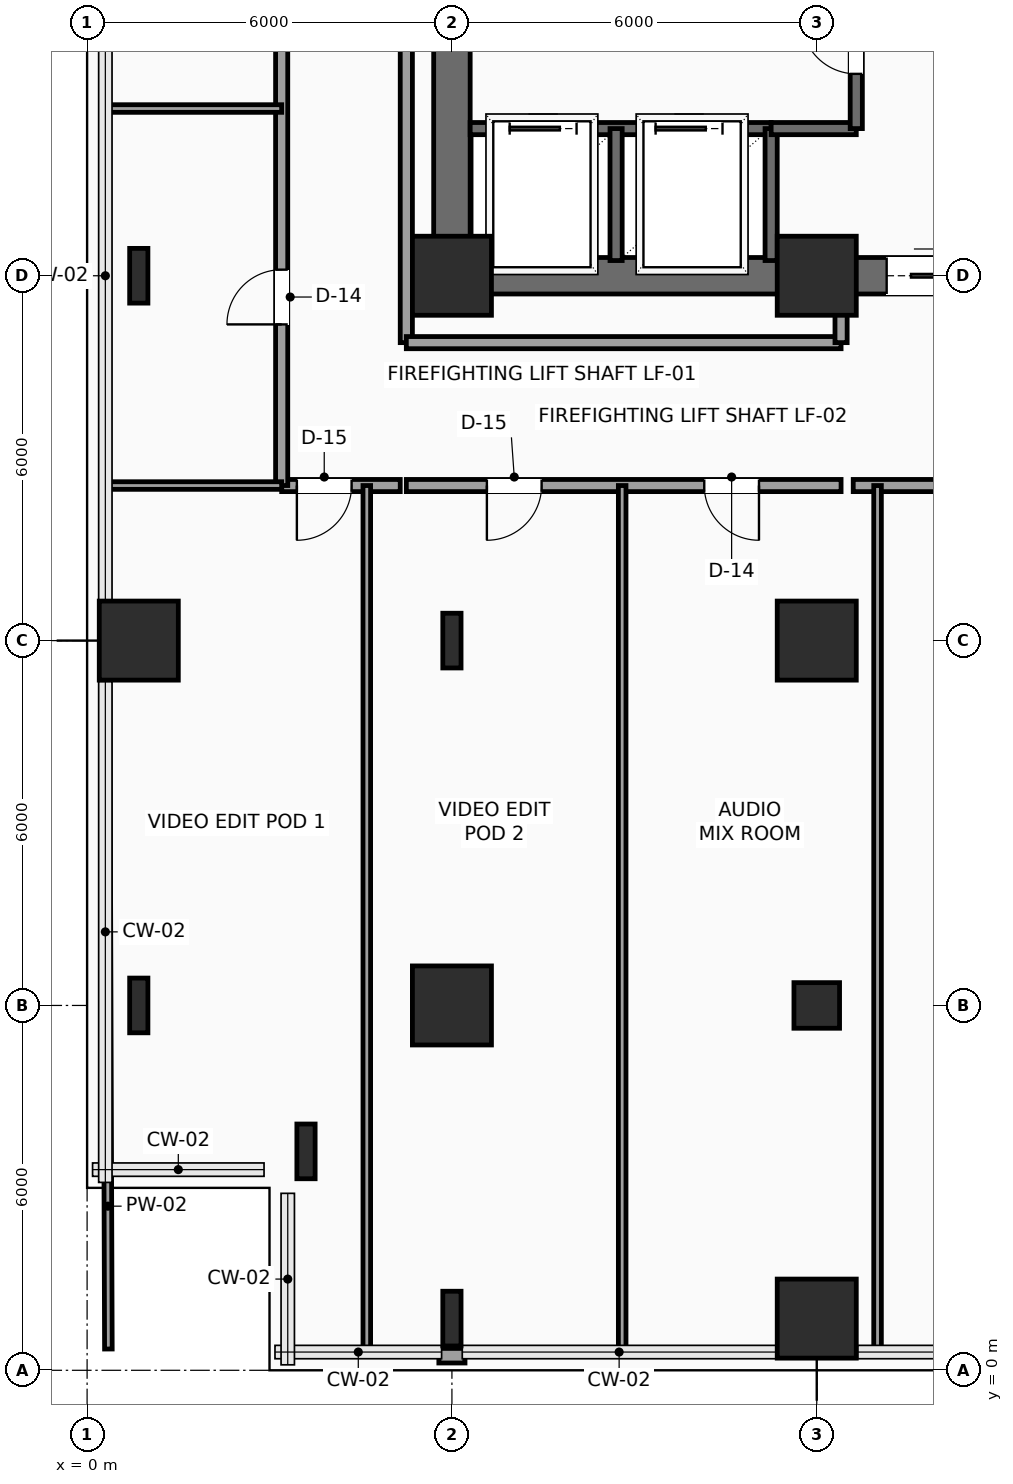
"""IFC4 building model, lengths in metres.
Left out: names, types, materials, properties, quantities, classifications, styles, units other than length and angle.
Written with IfcOpenShell. Run it as: python <this file> out.ifc"""

import sys

from ifc_helpers import new_model, si_unit, direction, frame, frame_2d, origin, origin_2d, place, context, subcontext, project, spatial, rectangle, hollow_rectangle, i_section, extrude, element, fill, save


model = new_model("IFC4")
c1 = context("Model", 3, precision=1e-05, world=origin(), true_north=direction((0.0, 1.0)))
c2 = subcontext(c1, "Body", "Model", "MODEL_VIEW")
j1 = project(units=[si_unit("LENGTHUNIT", "METRE"), si_unit("PLANEANGLEUNIT", "RADIAN")], contexts=[c1])
p1 = place(None, origin())
s1 = spatial("IfcSite", under=j1, at=p1, CompositionType="ELEMENT")
p2 = place(p1, origin())
s2 = spatial("IfcBuilding", under=s1, at=p2, CompositionType="ELEMENT")
p3 = place(p2, frame((0.0, 0.0, 44.1)))
s3 = spatial("IfcBuildingStorey", under=s2, at=p3, CompositionType="ELEMENT", Elevation=44.1)
for number, where, z_axis, x_axis in (
    (1, (6.0, 18.0, 0.0), (0.0, 0.0, 1.0), (1.0, 0.0, 0.0)),
    (2, (12.0, 18.0, 0.0), (0.0, 0.0, 1.0), (1.0, 0.0, 0.0)),
):
    element("IfcColumn", number, at=place(p3, frame(where, z_axis=z_axis, x_axis=x_axis)), inside=s3, PredefinedType="COLUMN", context=c2, shape_type="SweptSolid", body=[
        extrude(rectangle(XDim=1.3, YDim=1.3, at=origin_2d()), origin(), (0.0, 0.0, 1.0), 3.9),
    ])
for number, where, z_axis, x_axis in (
    (3, (3.6, 3.6, 0.0), (0.0, 0.0, 1.0), (1.0, 0.0, 0.0)),
    (4, (0.85, 6.0, 0.0), (0.0, 0.0, 1.0), (1.0, 0.0, 0.0)),
):
    element("IfcColumn", number, at=place(p3, frame(where, z_axis=z_axis, x_axis=x_axis)), inside=s3, PredefinedType="COLUMN", context=c2, shape_type="SweptSolid", body=[
        extrude(i_section(OverallWidth=0.3, OverallDepth=0.9, WebThickness=0.019, FlangeThickness=0.035, FilletRadius=0.03, at=origin_2d()), origin(), (0.0, 0.0, 1.0), 3.9),
    ])
p4 = place(p3, frame((0.85, 12.0, 0.0), z_axis=(0.0, 0.0, 1.0), x_axis=(1.0, 0.0, 0.0)))
e5 = element("IfcColumn", 5, at=p4, inside=s3, PredefinedType="COLUMN", context=c2, shape_type="SweptSolid", body=[
    extrude(rectangle(XDim=1.3, YDim=1.3, at=origin_2d()), origin(), (0.0, 0.0, 1.0), 3.9),
])
for number, where, z_axis, x_axis in (
    (6, (0.85, 18.0, 0.0), (0.0, 0.0, 1.0), (1.0, 0.0, 0.0)),
    (7, (6.0, 0.85, 0.0), (0.0, 0.0, 1.0), (1.0, 0.0, 0.0)),
):
    element("IfcColumn", number, at=place(p3, frame(where, z_axis=z_axis, x_axis=x_axis)), inside=s3, PredefinedType="COLUMN", context=c2, shape_type="SweptSolid", body=[
        extrude(i_section(OverallWidth=0.3, OverallDepth=0.9, WebThickness=0.019, FlangeThickness=0.035, FilletRadius=0.03, at=origin_2d()), origin(), (0.0, 0.0, 1.0), 3.9),
    ])
p5 = place(p3, frame((6.0, 6.0, 0.0), z_axis=(0.0, 0.0, 1.0), x_axis=(1.0, 0.0, 0.0)))
e8 = element("IfcColumn", 8, at=p5, inside=s3, PredefinedType="COLUMN", context=c2, shape_type="SweptSolid", body=[
    extrude(rectangle(XDim=1.3, YDim=1.3, at=origin_2d()), origin(), (0.0, 0.0, 1.0), 3.9),
])
p6 = place(p3, frame((6.0, 12.0, 0.0), z_axis=(0.0, 0.0, 1.0), x_axis=(1.0, 0.0, 0.0)))
e9 = element("IfcColumn", 9, at=p6, inside=s3, PredefinedType="COLUMN", context=c2, shape_type="SweptSolid", body=[
    extrude(i_section(OverallWidth=0.3, OverallDepth=0.9, WebThickness=0.019, FlangeThickness=0.035, FilletRadius=0.03, at=origin_2d()), origin(), (0.0, 0.0, 1.0), 3.9),
])
p7 = place(p3, frame((12.0, 0.85, 0.0), z_axis=(0.0, 0.0, 1.0), x_axis=(1.0, 0.0, 0.0)))
e10 = element("IfcColumn", 10, at=p7, inside=s3, PredefinedType="COLUMN", context=c2, shape_type="SweptSolid", body=[
    extrude(rectangle(XDim=1.3, YDim=1.3, at=origin_2d()), origin(), (0.0, 0.0, 1.0), 3.9),
])
p8 = place(p3, frame((12.0, 6.0, 0.0), z_axis=(0.0, 0.0, 1.0), x_axis=(1.0, 0.0, 0.0)))
e11 = element("IfcColumn", 11, at=p8, inside=s3, PredefinedType="COLUMN", context=c2, shape_type="SweptSolid", body=[
    extrude(hollow_rectangle(XDim=0.75, YDim=0.75, WallThickness=0.035, InnerFilletRadius=0.035, OuterFilletRadius=0.05, at=origin_2d()), origin(), (0.0, 0.0, 1.0), 3.9),
])
p9 = place(p3, frame((12.0, 12.0, 0.0), z_axis=(0.0, 0.0, 1.0), x_axis=(1.0, 0.0, 0.0)))
e12 = element("IfcColumn", 12, at=p9, inside=s3, PredefinedType="COLUMN", context=c2, shape_type="SweptSolid", body=[
    extrude(rectangle(XDim=1.3, YDim=1.3, at=origin_2d()), origin(), (0.0, 0.0, 1.0), 3.9),
])
p10 = place(p3, frame((6.215, 0.24, 0.0), z_axis=(0.0, 0.0, 1.0), x_axis=(-1.0, 0.0, 0.0)))
e13 = element("IfcWall", 13, at=p10, inside=s3, PredefinedType="SOLIDWALL", context=c2, shape_type="SweptSolid", body=[
    extrude(rectangle(XDim=0.43, YDim=0.24, at=frame_2d((0.215, 0.0))), origin(), (0.0, 0.0, 1.0), 3.65),
])
p11 = place(p3, frame((6.0, 18.0, 0.0), z_axis=(0.0, 0.0, 1.0), x_axis=(1.0, 0.0, 0.0)))
e14 = element("IfcWall", 14, at=p11, inside=s3, PredefinedType="SHEAR", context=c2, shape_type="SweptSolid", body=[
    extrude(rectangle(XDim=12.0, YDim=0.6, at=frame_2d((6.0, 0.0))), origin(), (0.0, 0.0, 1.0), 3.65),
])
p12 = place(p11, frame((7.15, 0.0, 0.0)))
e15 = element("IfcOpeningElement", 15, at=p12, cuts=e14, PredefinedType="OPENING", context=c2, shape_type="SweptSolid", body=[
    extrude(rectangle(XDim=1.6, YDim=2.3, at=frame_2d((0.8, 1.15))), frame((0.0, 0.31, 0.0), z_axis=(0.0, -1.0, 0.0), x_axis=(1.0, 0.0, 0.0)), (0.0, 0.0, 1.0), 0.62),
])
p13 = place(p3, frame((6.0, 18.0, 0.0), z_axis=(0.0, 0.0, 1.0), x_axis=(0.0, 1.0, 0.0)))
e16 = element("IfcWall", 16, at=p13, inside=s3, PredefinedType="SHEAR", context=c2, shape_type="SweptSolid", body=[
    extrude(rectangle(XDim=9.6, YDim=0.6, at=frame_2d((4.8, 0.0))), origin(), (0.0, 0.0, 1.0), 3.65),
])
p14 = place(p3, frame((6.3, 20.42, 0.0), z_axis=(0.0, 0.0, 1.0), x_axis=(1.0, 0.0, 0.0)))
e17 = element("IfcWall", 17, at=p14, inside=s3, PredefinedType="SHEAR", context=c2, shape_type="SweptSolid", body=[
    extrude(rectangle(XDim=4.95, YDim=0.2, at=frame_2d((2.475, 0.0))), origin(), (0.0, 0.0, 1.0), 3.65),
])
p15 = place(p14, frame((0.65, 0.0, 0.0)))
e18 = element("IfcOpeningElement", 18, at=p15, cuts=e17, PredefinedType="OPENING", context=c2, shape_type="SweptSolid", body=[
    extrude(rectangle(XDim=1.1, YDim=2.2, at=frame_2d((0.55, 1.1))), frame((0.0, 0.11, 0.0), z_axis=(0.0, -1.0, 0.0), x_axis=(1.0, 0.0, 0.0)), (0.0, 0.0, 1.0), 0.22),
])
p16 = place(p14, frame((3.05, 0.0, 0.0)))
e19 = element("IfcOpeningElement", 19, at=p16, cuts=e17, PredefinedType="OPENING", context=c2, shape_type="SweptSolid", body=[
    extrude(rectangle(XDim=1.1, YDim=2.2, at=frame_2d((0.55, 1.1))), frame((0.0, 0.11, 0.0), z_axis=(0.0, -1.0, 0.0), x_axis=(1.0, 0.0, 0.0)), (0.0, 0.0, 1.0), 0.22),
])
for number, where, z_axis, x_axis in (
    (20, (8.7, 18.25, 0.0), (0.0, 0.0, 1.0), (0.0, 1.0, 0.0)),
    (21, (11.25, 18.25, 0.0), (0.0, 0.0, 1.0), (0.0, 1.0, 0.0)),
):
    element("IfcWall", number, at=place(p3, frame(where, z_axis=z_axis, x_axis=x_axis)), inside=s3, PredefinedType="SHEAR", context=c2, shape_type="SweptSolid", body=[
        extrude(rectangle(XDim=2.17, YDim=0.2, at=frame_2d((1.085, 0.0))), origin(), (0.0, 0.0, 1.0), 3.65),
    ])
p17 = place(p3, frame((11.25, 20.42, 0.0), z_axis=(0.0, 0.0, 1.0), x_axis=(1.0, 0.0, 0.0)))
e22 = element("IfcWall", 22, at=p17, inside=s3, PredefinedType="SHEAR", context=c2, shape_type="SweptSolid", body=[
    extrude(rectangle(XDim=1.4, YDim=0.2, at=frame_2d((0.7, 0.0))), origin(), (0.0, 0.0, 1.0), 3.65),
])
p18 = place(p3, frame((12.65, 20.42, 0.0), z_axis=(0.0, 0.0, 1.0), x_axis=(0.0, 1.0, 0.0)))
e23 = element("IfcWall", 23, at=p18, inside=s3, PredefinedType="SHEAR", context=c2, shape_type="SweptSolid", body=[
    extrude(rectangle(XDim=2.84, YDim=0.2, at=frame_2d((1.42, 0.0))), origin(), (0.0, 0.0, 1.0), 3.65),
])
p19 = place(p18, frame((0.9, 0.0, 0.0)))
e24 = element("IfcOpeningElement", 24, at=p19, cuts=e23, PredefinedType="OPENING", context=c2, shape_type="SweptSolid", body=[
    extrude(rectangle(XDim=0.9, YDim=2.15, at=frame_2d((0.45, 1.075))), frame((0.0, 0.11, 0.0), z_axis=(0.0, -1.0, 0.0), x_axis=(1.0, 0.0, 0.0)), (0.0, 0.0, 1.0), 0.22),
])
p20 = place(p3, frame((21.55, 14.55, 0.0), z_axis=(0.0, 0.0, 1.0), x_axis=(-1.0, 0.0, 0.0)))
e25 = element("IfcWall", 25, at=p20, inside=s3, PredefinedType="PARTITIONING", context=c2, shape_type="SweptSolid", body=[
    extrude(rectangle(XDim=8.95, YDim=0.2, at=frame_2d((4.475, 0.0))), origin(), (0.0, 0.0, 1.0), 3.65),
])
p21 = place(p20, frame((6.0, 0.0, 0.0)))
e26 = element("IfcOpeningElement", 26, at=p21, cuts=e25, PredefinedType="OPENING", context=c2, shape_type="SweptSolid", body=[
    extrude(rectangle(XDim=0.9, YDim=2.1, at=frame_2d((0.45, 1.05))), frame((0.0, 0.11, 0.0), z_axis=(0.0, -1.0, 0.0), x_axis=(1.0, 0.0, 0.0)), (0.0, 0.0, 1.0), 0.22),
])
p22 = place(p20, frame((1.725, 0.0, 0.0)))
e27 = element("IfcOpeningElement", 27, at=p22, cuts=e25, PredefinedType="OPENING", context=c2, shape_type="SweptSolid", body=[
    extrude(rectangle(XDim=0.9, YDim=2.1, at=frame_2d((0.45, 1.05))), frame((0.0, 0.11, 0.0), z_axis=(0.0, -1.0, 0.0), x_axis=(1.0, 0.0, 0.0)), (0.0, 0.0, 1.0), 0.22),
])
p23 = place(p3, frame((12.4, 14.55, 0.0), z_axis=(0.0, 0.0, 1.0), x_axis=(-1.0, 0.0, 0.0)))
e28 = element("IfcWall", 28, at=p23, inside=s3, PredefinedType="PARTITIONING", context=c2, shape_type="SweptSolid", body=[
    extrude(rectangle(XDim=7.15, YDim=0.2, at=frame_2d((3.575, 0.0))), origin(), (0.0, 0.0, 1.0), 3.65),
])
p24 = place(p23, frame((4.925, 0.0, 0.0)))
e29 = element("IfcOpeningElement", 29, at=p24, cuts=e28, PredefinedType="OPENING", context=c2, shape_type="SweptSolid", body=[
    extrude(rectangle(XDim=0.9, YDim=2.1, at=frame_2d((0.45, 1.05))), frame((0.0, 0.11, 0.0), z_axis=(0.0, -1.0, 0.0), x_axis=(1.0, 0.0, 0.0)), (0.0, 0.0, 1.0), 0.22),
])
p25 = place(p23, frame((1.35, 0.0, 0.0)))
e30 = element("IfcOpeningElement", 30, at=p25, cuts=e28, PredefinedType="OPENING", context=c2, shape_type="SweptSolid", body=[
    extrude(rectangle(XDim=0.9, YDim=2.1, at=frame_2d((0.45, 1.05))), frame((0.0, 0.11, 0.0), z_axis=(0.0, -1.0, 0.0), x_axis=(1.0, 0.0, 0.0)), (0.0, 0.0, 1.0), 0.22),
])
p26 = place(p3, frame((5.15, 14.55, 0.0), z_axis=(0.0, 0.0, 1.0), x_axis=(-1.0, 0.0, 0.0)))
e31 = element("IfcWall", 31, at=p26, inside=s3, PredefinedType="PARTITIONING", context=c2, shape_type="SweptSolid", body=[
    extrude(rectangle(XDim=1.95, YDim=0.2, at=frame_2d((0.975, 0.0))), origin(), (0.0, 0.0, 1.0), 3.65),
])
p27 = place(p26, frame((0.8, 0.0, 0.0)))
e32 = element("IfcOpeningElement", 32, at=p27, cuts=e31, PredefinedType="OPENING", context=c2, shape_type="SweptSolid", body=[
    extrude(rectangle(XDim=0.9, YDim=2.1, at=frame_2d((0.45, 1.05))), frame((0.0, 0.11, 0.0), z_axis=(0.0, -1.0, 0.0), x_axis=(1.0, 0.0, 0.0)), (0.0, 0.0, 1.0), 0.22),
])
p28 = place(p3, frame((3.2, 14.55, 0.0), z_axis=(0.0, 0.0, 1.0), x_axis=(0.0, 1.0, 0.0)))
e33 = element("IfcWall", 33, at=p28, inside=s3, PredefinedType="PARTITIONING", context=c2, shape_type="SweptSolid", body=[
    extrude(rectangle(XDim=15.7, YDim=0.2, at=frame_2d((7.85, 0.0))), origin(), (0.0, 0.0, 1.0), 3.65),
])
p29 = place(p28, frame((2.65, 0.0, 0.0)))
e34 = element("IfcOpeningElement", 34, at=p29, cuts=e33, PredefinedType="OPENING", context=c2, shape_type="SweptSolid", body=[
    extrude(rectangle(XDim=0.9, YDim=2.1, at=frame_2d((0.45, 1.05))), frame((0.0, 0.11, 0.0), z_axis=(0.0, -1.0, 0.0), x_axis=(1.0, 0.0, 0.0)), (0.0, 0.0, 1.0), 0.22),
])
p30 = place(p28, frame((8.85, 0.0, 0.0)))
e35 = element("IfcOpeningElement", 35, at=p30, cuts=e33, PredefinedType="OPENING", context=c2, shape_type="SweptSolid", body=[
    extrude(rectangle(XDim=0.9, YDim=2.1, at=frame_2d((0.45, 1.05))), frame((0.0, 0.11, 0.0), z_axis=(0.0, -1.0, 0.0), x_axis=(1.0, 0.0, 0.0)), (0.0, 0.0, 1.0), 0.22),
])
p31 = place(p28, frame((13.6, 0.0, 0.0)))
e36 = element("IfcOpeningElement", 36, at=p31, cuts=e33, PredefinedType="OPENING", context=c2, shape_type="SweptSolid", body=[
    extrude(rectangle(XDim=0.9, YDim=2.1, at=frame_2d((0.45, 1.05))), frame((0.0, 0.11, 0.0), z_axis=(0.0, -1.0, 0.0), x_axis=(1.0, 0.0, 0.0)), (0.0, 0.0, 1.0), 0.22),
])
p32 = place(p3, frame((5.25, 30.25, 0.0), z_axis=(0.0, 0.0, 1.0), x_axis=(0.0, -1.0, 0.0)))
e37 = element("IfcWall", 37, at=p32, inside=s3, PredefinedType="PARTITIONING", context=c2, shape_type="SweptSolid", body=[
    extrude(rectangle(XDim=13.35, YDim=0.2, at=frame_2d((6.675, 0.0))), origin(), (0.0, 0.0, 1.0), 3.65),
])
p33 = place(p3, frame((5.25, 16.9, 0.0), z_axis=(0.0, 0.0, 1.0), x_axis=(1.0, 0.0, 0.0)))
e38 = element("IfcWall", 38, at=p33, inside=s3, PredefinedType="PARTITIONING", context=c2, shape_type="SweptSolid", body=[
    extrude(rectangle(XDim=7.15, YDim=0.2, at=frame_2d((3.575, 0.0))), origin(), (0.0, 0.0, 1.0), 3.65),
])
p34 = place(p3, frame((12.4, 16.9, 0.0), z_axis=(0.0, 0.0, 1.0), x_axis=(0.0, 1.0, 0.0)))
e39 = element("IfcWall", 39, at=p34, inside=s3, PredefinedType="PARTITIONING", context=c2, shape_type="SweptSolid", body=[
    extrude(rectangle(XDim=1.05, YDim=0.2, at=frame_2d((0.525, 0.0))), origin(), (0.0, 0.0, 1.0), 3.65),
])
p35 = place(p3, frame((0.35, 0.35, 0.0), z_axis=(0.0, 0.0, 1.0), x_axis=(-0.003524555588, 0.999993788735, 0.0)))
e40 = element("IfcWall", 40, at=p35, inside=s3, PredefinedType="PARTITIONING", context=c2, shape_type="SweptSolid", body=[
    extrude(rectangle(XDim=14.2, YDim=0.125, at=frame_2d((7.1, 0.0))), origin(), (0.0, 0.0, 1.0), 3.65),
])
for number, where, z_axis, x_axis in (
    (41, (4.6, 0.3, 0.0), (0.0, 0.0, 1.0), (0.0, 1.0, 0.0)),
    (42, (8.8, 0.3, 0.0), (0.0, 0.0, 1.0), (0.0, 1.0, 0.0)),
    (43, (13.0, 0.3, 0.0), (0.0, 0.0, 1.0), (0.0, 1.0, 0.0)),
):
    element("IfcWall", number, at=place(p3, frame(where, z_axis=z_axis, x_axis=x_axis)), inside=s3, PredefinedType="PARTITIONING", context=c2, shape_type="SweptSolid", body=[
        extrude(rectangle(XDim=14.25, YDim=0.125, at=frame_2d((7.125, 0.0))), origin(), (0.0, 0.0, 1.0), 3.65),
    ])
for number, where, z_axis, x_axis in (
    (44, (0.3, 14.55, 0.0), (0.0, 0.0, 1.0), (1.0, 0.0, 0.0)),
    (45, (0.3, 20.75, 0.0), (0.0, 0.0, 1.0), (1.0, 0.0, 0.0)),
):
    element("IfcWall", number, at=place(p3, frame(where, z_axis=z_axis, x_axis=x_axis)), inside=s3, PredefinedType="PARTITIONING", context=c2, shape_type="SweptSolid", body=[
        extrude(rectangle(XDim=2.9, YDim=0.125, at=frame_2d((1.45, 0.0))), origin(), (0.0, 0.0, 1.0), 3.65),
    ])
p36 = place(p12, origin())
e46 = element("IfcDoor", 46, at=p36, inside=s3, OperationType="DOUBLE_DOOR_SLIDING", PredefinedType="DOOR", context=c2, shape_type="SweptSolid", body=[
    extrude(rectangle(XDim=1.6, YDim=2.3, at=frame_2d((0.8, 1.15))), frame((0.0, 0.025, 0.0), z_axis=(0.0, -1.0, 0.0), x_axis=(1.0, 0.0, 0.0)), (0.0, 0.0, 1.0), 0.05),
])
fill(e15, e46)
p37 = place(p15, origin())
e47 = element("IfcDoor", 47, at=p37, inside=s3, OperationType="SLIDING_TO_LEFT", PredefinedType="DOOR", context=c2, shape_type="SweptSolid", body=[
    extrude(rectangle(XDim=1.1, YDim=2.2, at=frame_2d((0.55, 1.1))), frame((0.0, 0.025, 0.0), z_axis=(0.0, -1.0, 0.0), x_axis=(1.0, 0.0, 0.0)), (0.0, 0.0, 1.0), 0.05),
])
fill(e18, e47)
p38 = place(p16, origin())
e48 = element("IfcDoor", 48, at=p38, inside=s3, OperationType="SLIDING_TO_LEFT", PredefinedType="DOOR", context=c2, shape_type="SweptSolid", body=[
    extrude(rectangle(XDim=1.1, YDim=2.2, at=frame_2d((0.55, 1.1))), frame((0.0, 0.025, 0.0), z_axis=(0.0, -1.0, 0.0), x_axis=(1.0, 0.0, 0.0)), (0.0, 0.0, 1.0), 0.05),
])
fill(e19, e48)
p39 = place(p19, origin())
e49 = element("IfcDoor", 49, at=p39, inside=s3, OperationType="SINGLE_SWING_RIGHT", PredefinedType="DOOR", context=c2, shape_type="SweptSolid", body=[
    extrude(rectangle(XDim=0.9, YDim=2.15, at=frame_2d((0.45, 1.075))), frame((0.0, 0.025, 0.0), z_axis=(0.0, -1.0, 0.0), x_axis=(1.0, 0.0, 0.0)), (0.0, 0.0, 1.0), 0.05),
])
fill(e24, e49)
p40 = place(p24, origin())
e50 = element("IfcDoor", 50, at=p40, inside=s3, OperationType="SINGLE_SWING_RIGHT", PredefinedType="DOOR", context=c2, shape_type="SweptSolid", body=[
    extrude(rectangle(XDim=0.9, YDim=2.1, at=frame_2d((0.45, 1.05))), frame((0.0, 0.025, 0.0), z_axis=(0.0, -1.0, 0.0), x_axis=(1.0, 0.0, 0.0)), (0.0, 0.0, 1.0), 0.05),
])
fill(e29, e50)
p41 = place(p25, origin())
e51 = element("IfcDoor", 51, at=p41, inside=s3, OperationType="SINGLE_SWING_LEFT", PredefinedType="DOOR", context=c2, shape_type="SweptSolid", body=[
    extrude(rectangle(XDim=0.9, YDim=2.1, at=frame_2d((0.45, 1.05))), frame((0.0, 0.025, 0.0), z_axis=(0.0, -1.0, 0.0), x_axis=(1.0, 0.0, 0.0)), (0.0, 0.0, 1.0), 0.05),
])
fill(e30, e51)
p42 = place(p27, origin())
e52 = element("IfcDoor", 52, at=p42, inside=s3, OperationType="SINGLE_SWING_RIGHT", PredefinedType="DOOR", context=c2, shape_type="SweptSolid", body=[
    extrude(rectangle(XDim=0.9, YDim=2.1, at=frame_2d((0.45, 1.05))), frame((0.0, 0.025, 0.0), z_axis=(0.0, -1.0, 0.0), x_axis=(1.0, 0.0, 0.0)), (0.0, 0.0, 1.0), 0.05),
])
fill(e32, e52)
p43 = place(p29, origin())
e53 = element("IfcDoor", 53, at=p43, inside=s3, OperationType="SINGLE_SWING_LEFT", PredefinedType="DOOR", context=c2, shape_type="SweptSolid", body=[
    extrude(rectangle(XDim=0.9, YDim=2.1, at=frame_2d((0.45, 1.05))), frame((0.0, 0.025, 0.0), z_axis=(0.0, -1.0, 0.0), x_axis=(1.0, 0.0, 0.0)), (0.0, 0.0, 1.0), 0.05),
])
fill(e34, e53)
save(model, sys.argv[1])
